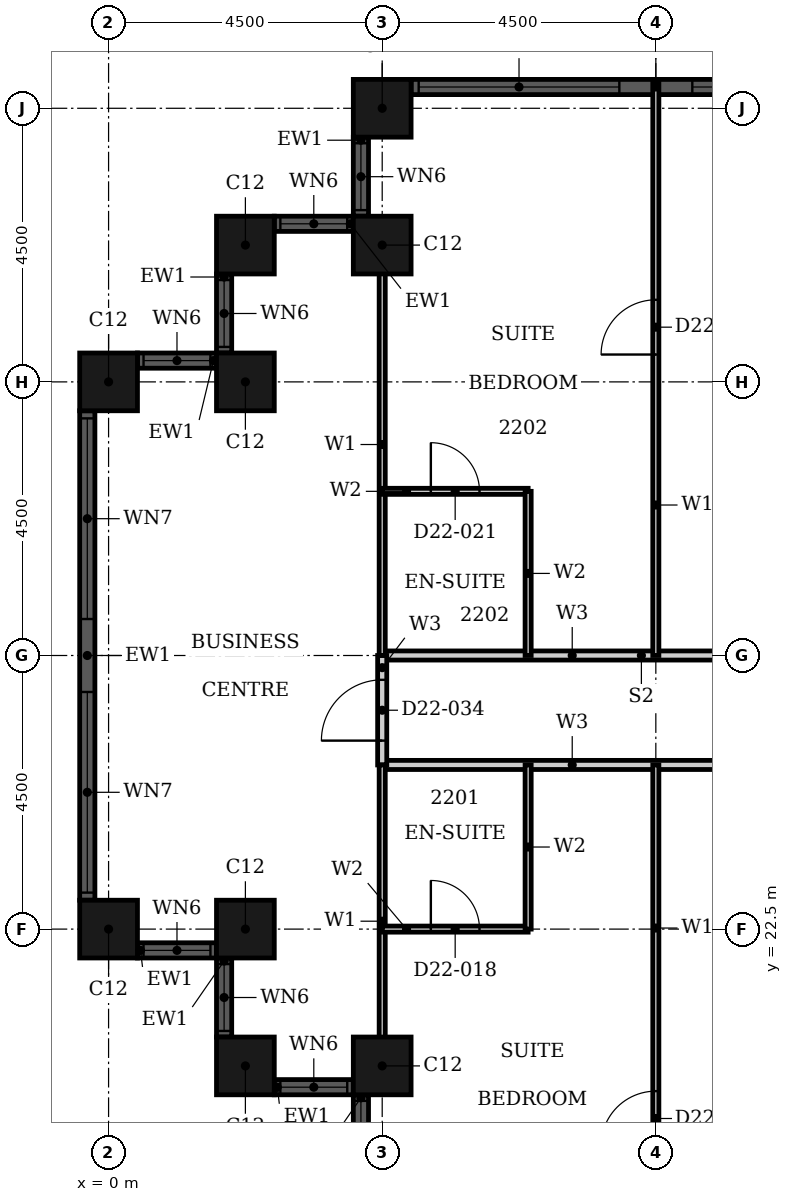
"""IFC4 building model, lengths in metres.
Left out: names, types, materials, properties, quantities, classifications, styles, units other than length and angle.
Written with IfcOpenShell. Run it as: python <this file> out.ifc"""

import sys

from ifc_helpers import new_model, si_unit, direction, frame, frame_2d, origin, origin_2d, place, context, subcontext, project, spatial, rectangle, hollow_rectangle, extrude, element, fill, save


model = new_model("IFC4")
c1 = context("Model", 3, precision=1e-05, world=origin(), true_north=direction((0.0, 1.0)))
c2 = subcontext(c1, "Body", "Model", "MODEL_VIEW")
j1 = project(units=[si_unit("LENGTHUNIT", "METRE"), si_unit("PLANEANGLEUNIT", "RADIAN")], contexts=[c1])
p1 = place(None, origin())
s1 = spatial("IfcSite", under=j1, at=p1, CompositionType="ELEMENT")
p2 = place(p1, origin())
s2 = spatial("IfcBuilding", under=s1, at=p2, CompositionType="ELEMENT")
p3 = place(p2, frame((0.0, 0.0, 92.4)))
s3 = spatial("IfcBuildingStorey", under=s2, at=p3, CompositionType="ELEMENT", Elevation=92.4)
for number, where, z_axis, x_axis in (
    (1, (4.5, 36.0, 0.0), (0.0, 0.0, 1.0), (1.0, 0.0, 0.0)),
    (2, (4.5, 33.75, 0.0), (0.0, 0.0, 1.0), (1.0, 0.0, 0.0)),
    (3, (2.25, 33.75, 0.0), (0.0, 0.0, 1.0), (1.0, 0.0, 0.0)),
    (4, (2.25, 31.5, 0.0), (0.0, 0.0, 1.0), (1.0, 0.0, 0.0)),
    (5, (0.0, 31.5, 0.0), (0.0, 0.0, 1.0), (1.0, 0.0, 0.0)),
    (6, (0.0, 22.5, 0.0), (0.0, 0.0, 1.0), (1.0, 0.0, 0.0)),
    (7, (2.25, 22.5, 0.0), (0.0, 0.0, 1.0), (1.0, 0.0, 0.0)),
    (8, (2.25, 20.25, 0.0), (0.0, 0.0, 1.0), (1.0, 0.0, 0.0)),
    (9, (4.5, 20.25, 0.0), (0.0, 0.0, 1.0), (1.0, 0.0, 0.0)),
):
    element("IfcColumn", number, at=place(p3, frame(where, z_axis=z_axis, x_axis=x_axis)), inside=s3, PredefinedType="COLUMN", context=c2, shape_type="SweptSolid", body=[
        extrude(hollow_rectangle(XDim=0.95, YDim=0.95, WallThickness=0.03, at=origin_2d()), origin(), (0.0, 0.0, 1.0), 3.6),
    ])
p4 = place(p3, frame((13.025, 36.35, 0.0), z_axis=(0.0, 0.0, 1.0), x_axis=(-1.0, 0.0, 0.0)))
e10 = element("IfcWall", 10, at=p4, inside=s3, PredefinedType="SOLIDWALL", context=c2, shape_type="SweptSolid", body=[
    extrude(rectangle(XDim=8.05, YDim=0.25, at=frame_2d((4.025, 0.0))), origin(), (0.0, 0.0, 1.0), 3.6),
])
p5 = place(p4, frame((0.125, 0.0, 0.9)))
e11 = element("IfcOpeningElement", 11, at=p5, cuts=e10, PredefinedType="OPENING", context=c2, shape_type="SweptSolid", body=[
    extrude(rectangle(XDim=3.3, YDim=1.85, at=frame_2d((1.65, 0.925))), frame((0.0, 0.135, 0.0), z_axis=(0.0, -1.0, 0.0), x_axis=(1.0, 0.0, 0.0)), (0.0, 0.0, 1.0), 0.27),
])
p6 = place(p4, frame((4.625, 0.0, 0.9)))
e12 = element("IfcOpeningElement", 12, at=p6, cuts=e10, PredefinedType="OPENING", context=c2, shape_type="SweptSolid", body=[
    extrude(rectangle(XDim=3.3, YDim=1.85, at=frame_2d((1.65, 0.925))), frame((0.0, 0.135, 0.0), z_axis=(0.0, -1.0, 0.0), x_axis=(1.0, 0.0, 0.0)), (0.0, 0.0, 1.0), 0.27),
])
p7 = place(p3, frame((4.15, 35.525, 0.0), z_axis=(0.0, 0.0, 1.0), x_axis=(0.0, -1.0, 0.0)))
e13 = element("IfcWall", 13, at=p7, inside=s3, PredefinedType="SOLIDWALL", context=c2, shape_type="SweptSolid", body=[
    extrude(rectangle(XDim=1.3, YDim=0.25, at=frame_2d((0.65, 0.0))), origin(), (0.0, 0.0, 1.0), 3.6),
])
p8 = place(p7, frame((0.1, 0.0, 0.9)))
e14 = element("IfcOpeningElement", 14, at=p8, cuts=e13, PredefinedType="OPENING", context=c2, shape_type="SweptSolid", body=[
    extrude(rectangle(XDim=1.1, YDim=1.85, at=frame_2d((0.55, 0.925))), frame((0.0, 0.135, 0.0), z_axis=(0.0, -1.0, 0.0), x_axis=(1.0, 0.0, 0.0)), (0.0, 0.0, 1.0), 0.27),
])
p9 = place(p3, frame((4.025, 34.1, 0.0), z_axis=(0.0, 0.0, 1.0), x_axis=(-1.0, 0.0, 0.0)))
e15 = element("IfcWall", 15, at=p9, inside=s3, PredefinedType="SOLIDWALL", context=c2, shape_type="SweptSolid", body=[
    extrude(rectangle(XDim=1.3, YDim=0.25, at=frame_2d((0.65, 0.0))), origin(), (0.0, 0.0, 1.0), 3.6),
])
p10 = place(p9, frame((0.1, 0.0, 0.9)))
e16 = element("IfcOpeningElement", 16, at=p10, cuts=e15, PredefinedType="OPENING", context=c2, shape_type="SweptSolid", body=[
    extrude(rectangle(XDim=1.1, YDim=1.85, at=frame_2d((0.55, 0.925))), frame((0.0, 0.135, 0.0), z_axis=(0.0, -1.0, 0.0), x_axis=(1.0, 0.0, 0.0)), (0.0, 0.0, 1.0), 0.27),
])
p11 = place(p3, frame((1.9, 33.275, 0.0), z_axis=(0.0, 0.0, 1.0), x_axis=(0.0, -1.0, 0.0)))
e17 = element("IfcWall", 17, at=p11, inside=s3, PredefinedType="SOLIDWALL", context=c2, shape_type="SweptSolid", body=[
    extrude(rectangle(XDim=1.3, YDim=0.25, at=frame_2d((0.65, 0.0))), origin(), (0.0, 0.0, 1.0), 3.6),
])
p12 = place(p11, frame((0.1, 0.0, 0.9)))
e18 = element("IfcOpeningElement", 18, at=p12, cuts=e17, PredefinedType="OPENING", context=c2, shape_type="SweptSolid", body=[
    extrude(rectangle(XDim=1.1, YDim=1.85, at=frame_2d((0.55, 0.925))), frame((0.0, 0.135, 0.0), z_axis=(0.0, -1.0, 0.0), x_axis=(1.0, 0.0, 0.0)), (0.0, 0.0, 1.0), 0.27),
])
p13 = place(p3, frame((1.775, 31.85, 0.0), z_axis=(0.0, 0.0, 1.0), x_axis=(-1.0, 0.0, 0.0)))
e19 = element("IfcWall", 19, at=p13, inside=s3, PredefinedType="SOLIDWALL", context=c2, shape_type="SweptSolid", body=[
    extrude(rectangle(XDim=1.3, YDim=0.25, at=frame_2d((0.65, 0.0))), origin(), (0.0, 0.0, 1.0), 3.6),
])
p14 = place(p13, frame((0.1, 0.0, 0.9)))
e20 = element("IfcOpeningElement", 20, at=p14, cuts=e19, PredefinedType="OPENING", context=c2, shape_type="SweptSolid", body=[
    extrude(rectangle(XDim=1.1, YDim=1.85, at=frame_2d((0.55, 0.925))), frame((0.0, 0.135, 0.0), z_axis=(0.0, -1.0, 0.0), x_axis=(1.0, 0.0, 0.0)), (0.0, 0.0, 1.0), 0.27),
])
p15 = place(p3, frame((-0.35, 31.025, 0.0), z_axis=(0.0, 0.0, 1.0), x_axis=(0.0, -1.0, 0.0)))
e21 = element("IfcWall", 21, at=p15, inside=s3, PredefinedType="SOLIDWALL", context=c2, shape_type="SweptSolid", body=[
    extrude(rectangle(XDim=8.05, YDim=0.25, at=frame_2d((4.025, 0.0))), origin(), (0.0, 0.0, 1.0), 3.6),
])
p16 = place(p15, frame((0.125, 0.0, 0.9)))
e22 = element("IfcOpeningElement", 22, at=p16, cuts=e21, PredefinedType="OPENING", context=c2, shape_type="SweptSolid", body=[
    extrude(rectangle(XDim=3.3, YDim=1.85, at=frame_2d((1.65, 0.925))), frame((0.0, 0.135, 0.0), z_axis=(0.0, -1.0, 0.0), x_axis=(1.0, 0.0, 0.0)), (0.0, 0.0, 1.0), 0.27),
])
p17 = place(p15, frame((4.625, 0.0, 0.9)))
e23 = element("IfcOpeningElement", 23, at=p17, cuts=e21, PredefinedType="OPENING", context=c2, shape_type="SweptSolid", body=[
    extrude(rectangle(XDim=3.3, YDim=1.85, at=frame_2d((1.65, 0.925))), frame((0.0, 0.135, 0.0), z_axis=(0.0, -1.0, 0.0), x_axis=(1.0, 0.0, 0.0)), (0.0, 0.0, 1.0), 0.27),
])
p18 = place(p3, frame((0.475, 22.15, 0.0), z_axis=(0.0, 0.0, 1.0), x_axis=(1.0, 0.0, 0.0)))
e24 = element("IfcWall", 24, at=p18, inside=s3, PredefinedType="SOLIDWALL", context=c2, shape_type="SweptSolid", body=[
    extrude(rectangle(XDim=1.3, YDim=0.25, at=frame_2d((0.65, 0.0))), origin(), (0.0, 0.0, 1.0), 3.6),
])
p19 = place(p18, frame((0.1, 0.0, 0.9)))
e25 = element("IfcOpeningElement", 25, at=p19, cuts=e24, PredefinedType="OPENING", context=c2, shape_type="SweptSolid", body=[
    extrude(rectangle(XDim=1.1, YDim=1.85, at=frame_2d((0.55, 0.925))), frame((0.0, 0.135, 0.0), z_axis=(0.0, -1.0, 0.0), x_axis=(1.0, 0.0, 0.0)), (0.0, 0.0, 1.0), 0.27),
])
p20 = place(p3, frame((1.9, 22.025, 0.0), z_axis=(0.0, 0.0, 1.0), x_axis=(0.0, -1.0, 0.0)))
e26 = element("IfcWall", 26, at=p20, inside=s3, PredefinedType="SOLIDWALL", context=c2, shape_type="SweptSolid", body=[
    extrude(rectangle(XDim=1.3, YDim=0.25, at=frame_2d((0.65, 0.0))), origin(), (0.0, 0.0, 1.0), 3.6),
])
p21 = place(p20, frame((0.1, 0.0, 0.9)))
e27 = element("IfcOpeningElement", 27, at=p21, cuts=e26, PredefinedType="OPENING", context=c2, shape_type="SweptSolid", body=[
    extrude(rectangle(XDim=1.1, YDim=1.85, at=frame_2d((0.55, 0.925))), frame((0.0, 0.135, 0.0), z_axis=(0.0, -1.0, 0.0), x_axis=(1.0, 0.0, 0.0)), (0.0, 0.0, 1.0), 0.27),
])
p22 = place(p3, frame((2.725, 19.9, 0.0), z_axis=(0.0, 0.0, 1.0), x_axis=(1.0, 0.0, 0.0)))
e28 = element("IfcWall", 28, at=p22, inside=s3, PredefinedType="SOLIDWALL", context=c2, shape_type="SweptSolid", body=[
    extrude(rectangle(XDim=1.3, YDim=0.25, at=frame_2d((0.65, 0.0))), origin(), (0.0, 0.0, 1.0), 3.6),
])
p23 = place(p22, frame((0.1, 0.0, 0.9)))
e29 = element("IfcOpeningElement", 29, at=p23, cuts=e28, PredefinedType="OPENING", context=c2, shape_type="SweptSolid", body=[
    extrude(rectangle(XDim=1.1, YDim=1.85, at=frame_2d((0.55, 0.925))), frame((0.0, 0.135, 0.0), z_axis=(0.0, -1.0, 0.0), x_axis=(1.0, 0.0, 0.0)), (0.0, 0.0, 1.0), 0.27),
])
p24 = place(p3, frame((4.15, 19.775, 0.0), z_axis=(0.0, 0.0, 1.0), x_axis=(0.0, -1.0, 0.0)))
e30 = element("IfcWall", 30, at=p24, inside=s3, PredefinedType="SOLIDWALL", context=c2, shape_type="SweptSolid", body=[
    extrude(rectangle(XDim=1.3, YDim=0.25, at=frame_2d((0.65, 0.0))), origin(), (0.0, 0.0, 1.0), 3.6),
])
p25 = place(p24, frame((0.1, 0.0, 0.9)))
e31 = element("IfcOpeningElement", 31, at=p25, cuts=e30, PredefinedType="OPENING", context=c2, shape_type="SweptSolid", body=[
    extrude(rectangle(XDim=1.1, YDim=1.85, at=frame_2d((0.55, 0.925))), frame((0.0, 0.135, 0.0), z_axis=(0.0, -1.0, 0.0), x_axis=(1.0, 0.0, 0.0)), (0.0, 0.0, 1.0), 0.27),
])
p26 = place(p3, frame((4.5, 25.2, 0.0), z_axis=(0.0, 0.0, 1.0), x_axis=(1.0, 0.0, 0.0)))
e32 = element("IfcWall", 32, at=p26, inside=s3, PredefinedType="PARTITIONING", context=c2, shape_type="SweptSolid", body=[
    extrude(rectangle(XDim=11.7, YDim=0.15, at=frame_2d((5.85, 0.0))), origin(), (0.0, 0.0, 1.0), 3.2),
])
p27 = place(p26, frame((6.25, 0.0, 0.0)))
e33 = element("IfcOpeningElement", 33, at=p27, cuts=e32, PredefinedType="OPENING", context=c2, shape_type="SweptSolid", body=[
    extrude(rectangle(XDim=1.0, YDim=2.1, at=frame_2d((0.5, 1.05))), frame((0.0, 0.085, 0.0), z_axis=(0.0, -1.0, 0.0), x_axis=(1.0, 0.0, 0.0)), (0.0, 0.0, 1.0), 0.17),
])
p28 = place(p3, frame((4.5, 27.0, 0.0), z_axis=(0.0, 0.0, 1.0), x_axis=(1.0, 0.0, 0.0)))
e34 = element("IfcWall", 34, at=p28, inside=s3, PredefinedType="PARTITIONING", context=c2, shape_type="SweptSolid", body=[
    extrude(rectangle(XDim=11.7, YDim=0.15, at=frame_2d((5.85, 0.0))), origin(), (0.0, 0.0, 1.0), 2.48),
])
p29 = place(p28, frame((6.25, 0.0, 0.0)))
e35 = element("IfcOpeningElement", 35, at=p29, cuts=e34, PredefinedType="OPENING", context=c2, shape_type="SweptSolid", body=[
    extrude(rectangle(XDim=1.0, YDim=2.1, at=frame_2d((0.5, 1.05))), frame((0.0, 0.085, 0.0), z_axis=(0.0, -1.0, 0.0), x_axis=(1.0, 0.0, 0.0)), (0.0, 0.0, 1.0), 0.17),
])
p30 = place(p3, frame((4.5, 25.2, 0.0), z_axis=(0.0, 0.0, 1.0), x_axis=(0.0, 1.0, 0.0)))
e36 = element("IfcWall", 36, at=p30, inside=s3, PredefinedType="PARTITIONING", context=c2, shape_type="SweptSolid", body=[
    extrude(rectangle(XDim=1.8, YDim=0.15, at=frame_2d((0.9, 0.0))), origin(), (0.0, 0.0, 1.0), 3.2),
])
p31 = place(p30, frame((0.4, 0.0, 0.0)))
e37 = element("IfcOpeningElement", 37, at=p31, cuts=e36, PredefinedType="OPENING", context=c2, shape_type="SweptSolid", body=[
    extrude(rectangle(XDim=1.0, YDim=2.1, at=frame_2d((0.5, 1.05))), frame((0.0, 0.085, 0.0), z_axis=(0.0, -1.0, 0.0), x_axis=(1.0, 0.0, 0.0)), (0.0, 0.0, 1.0), 0.17),
])
p32 = place(p3, frame((4.5, 27.0, 0.0), z_axis=(0.0, 0.0, 1.0), x_axis=(0.0, 1.0, 0.0)))
e38 = element("IfcWall", 38, at=p32, inside=s3, PredefinedType="PARTITIONING", context=c2, shape_type="SweptSolid", body=[
    extrude(rectangle(XDim=6.94, YDim=0.1, at=frame_2d((3.47, 0.0))), origin(), (0.0, 0.0, 1.0), 3.2),
])
p33 = place(p3, frame((4.5, 20.06, 0.0), z_axis=(0.0, 0.0, 1.0), x_axis=(0.0, 1.0, 0.0)))
e39 = element("IfcWall", 39, at=p33, inside=s3, PredefinedType="PARTITIONING", context=c2, shape_type="SweptSolid", body=[
    extrude(rectangle(XDim=5.14, YDim=0.1, at=frame_2d((2.57, 0.0))), origin(), (0.0, 0.0, 1.0), 3.2),
])
p34 = place(p3, frame((9.0, 27.0, 0.0), z_axis=(0.0, 0.0, 1.0), x_axis=(0.0, 1.0, 0.0)))
e40 = element("IfcWall", 40, at=p34, inside=s3, PredefinedType="PARTITIONING", context=c2, shape_type="SweptSolid", body=[
    extrude(rectangle(XDim=9.415, YDim=0.1, at=frame_2d((4.708, 0.0))), origin(), (0.0, 0.0, 1.0), 3.2),
])
p35 = place(p34, frame((4.95, 0.0, 0.0)))
e41 = element("IfcOpeningElement", 41, at=p35, cuts=e40, PredefinedType="OPENING", context=c2, shape_type="SweptSolid", body=[
    extrude(rectangle(XDim=0.9, YDim=2.1, at=frame_2d((0.45, 1.05))), frame((0.0, 0.06, 0.0), z_axis=(0.0, -1.0, 0.0), x_axis=(1.0, 0.0, 0.0)), (0.0, 0.0, 1.0), 0.12),
])
p36 = place(p3, frame((9.0, 17.585, 0.0), z_axis=(0.0, 0.0, 1.0), x_axis=(0.0, 1.0, 0.0)))
e42 = element("IfcWall", 42, at=p36, inside=s3, PredefinedType="PARTITIONING", context=c2, shape_type="SweptSolid", body=[
    extrude(rectangle(XDim=7.615, YDim=0.1, at=frame_2d((3.808, 0.0))), origin(), (0.0, 0.0, 1.0), 3.2),
])
p37 = place(p36, frame((1.35, 0.0, 0.0)))
e43 = element("IfcOpeningElement", 43, at=p37, cuts=e42, PredefinedType="OPENING", context=c2, shape_type="SweptSolid", body=[
    extrude(rectangle(XDim=0.9, YDim=2.1, at=frame_2d((0.45, 1.05))), frame((0.0, 0.06, 0.0), z_axis=(0.0, -1.0, 0.0), x_axis=(1.0, 0.0, 0.0)), (0.0, 0.0, 1.0), 0.12),
])
p38 = place(p3, frame((4.5, 22.5, 0.0), z_axis=(0.0, 0.0, 1.0), x_axis=(1.0, 0.0, 0.0)))
e44 = element("IfcWall", 44, at=p38, inside=s3, PredefinedType="PARTITIONING", context=c2, shape_type="SweptSolid", body=[
    extrude(rectangle(XDim=2.4, YDim=0.1, at=frame_2d((1.2, 0.0))), origin(), (0.0, 0.0, 1.0), 2.48),
])
p39 = place(p38, frame((0.8, 0.0, 0.0)))
e45 = element("IfcOpeningElement", 45, at=p39, cuts=e44, PredefinedType="OPENING", context=c2, shape_type="SweptSolid", body=[
    extrude(rectangle(XDim=0.8, YDim=2.1, at=frame_2d((0.4, 1.05))), frame((0.0, 0.06, 0.0), z_axis=(0.0, -1.0, 0.0), x_axis=(1.0, 0.0, 0.0)), (0.0, 0.0, 1.0), 0.12),
])
p40 = place(p3, frame((4.5, 29.7, 0.0), z_axis=(0.0, 0.0, 1.0), x_axis=(1.0, 0.0, 0.0)))
e46 = element("IfcWall", 46, at=p40, inside=s3, PredefinedType="PARTITIONING", context=c2, shape_type="SweptSolid", body=[
    extrude(rectangle(XDim=2.4, YDim=0.1, at=frame_2d((1.2, 0.0))), origin(), (0.0, 0.0, 1.0), 3.2),
])
p41 = place(p40, frame((0.8, 0.0, 0.0)))
e47 = element("IfcOpeningElement", 47, at=p41, cuts=e46, PredefinedType="OPENING", context=c2, shape_type="SweptSolid", body=[
    extrude(rectangle(XDim=0.8, YDim=2.1, at=frame_2d((0.4, 1.05))), frame((0.0, 0.06, 0.0), z_axis=(0.0, -1.0, 0.0), x_axis=(1.0, 0.0, 0.0)), (0.0, 0.0, 1.0), 0.12),
])
for number, where, z_axis, x_axis in (
    (48, (6.9, 27.0, 0.0), (0.0, 0.0, 1.0), (0.0, 1.0, 0.0)),
    (49, (6.9, 22.5, 0.0), (0.0, 0.0, 1.0), (0.0, 1.0, 0.0)),
):
    element("IfcWall", number, at=place(p3, frame(where, z_axis=z_axis, x_axis=x_axis)), inside=s3, PredefinedType="PARTITIONING", context=c2, shape_type="SweptSolid", body=[
        extrude(rectangle(XDim=2.7, YDim=0.1, at=frame_2d((1.35, 0.0))), origin(), (0.0, 0.0, 1.0), 3.2),
    ])
p42 = place(p5, origin())
e50 = element("IfcWindow", 50, at=p42, inside=s3, PartitioningType="SINGLE_PANEL", PredefinedType="WINDOW", context=c2, shape_type="SweptSolid", body=[
    extrude(rectangle(XDim=3.3, YDim=1.85, at=frame_2d((1.65, 0.925))), frame((0.0, 0.03, 0.0), z_axis=(0.0, -1.0, 0.0), x_axis=(1.0, 0.0, 0.0)), (0.0, 0.0, 1.0), 0.06),
])
fill(e11, e50)
p43 = place(p6, origin())
e51 = element("IfcWindow", 51, at=p43, inside=s3, PartitioningType="SINGLE_PANEL", PredefinedType="WINDOW", context=c2, shape_type="SweptSolid", body=[
    extrude(rectangle(XDim=3.3, YDim=1.85, at=frame_2d((1.65, 0.925))), frame((0.0, 0.03, 0.0), z_axis=(0.0, -1.0, 0.0), x_axis=(1.0, 0.0, 0.0)), (0.0, 0.0, 1.0), 0.06),
])
fill(e12, e51)
p44 = place(p8, origin())
e52 = element("IfcWindow", 52, at=p44, inside=s3, PartitioningType="SINGLE_PANEL", PredefinedType="WINDOW", context=c2, shape_type="SweptSolid", body=[
    extrude(rectangle(XDim=1.1, YDim=1.85, at=frame_2d((0.55, 0.925))), frame((0.0, 0.03, 0.0), z_axis=(0.0, -1.0, 0.0), x_axis=(1.0, 0.0, 0.0)), (0.0, 0.0, 1.0), 0.06),
])
fill(e14, e52)
p45 = place(p10, origin())
e53 = element("IfcWindow", 53, at=p45, inside=s3, PartitioningType="SINGLE_PANEL", PredefinedType="WINDOW", context=c2, shape_type="SweptSolid", body=[
    extrude(rectangle(XDim=1.1, YDim=1.85, at=frame_2d((0.55, 0.925))), frame((0.0, 0.03, 0.0), z_axis=(0.0, -1.0, 0.0), x_axis=(1.0, 0.0, 0.0)), (0.0, 0.0, 1.0), 0.06),
])
fill(e16, e53)
p46 = place(p12, origin())
e54 = element("IfcWindow", 54, at=p46, inside=s3, PartitioningType="SINGLE_PANEL", PredefinedType="WINDOW", context=c2, shape_type="SweptSolid", body=[
    extrude(rectangle(XDim=1.1, YDim=1.85, at=frame_2d((0.55, 0.925))), frame((0.0, 0.03, 0.0), z_axis=(0.0, -1.0, 0.0), x_axis=(1.0, 0.0, 0.0)), (0.0, 0.0, 1.0), 0.06),
])
fill(e18, e54)
p47 = place(p14, origin())
e55 = element("IfcWindow", 55, at=p47, inside=s3, PartitioningType="SINGLE_PANEL", PredefinedType="WINDOW", context=c2, shape_type="SweptSolid", body=[
    extrude(rectangle(XDim=1.1, YDim=1.85, at=frame_2d((0.55, 0.925))), frame((0.0, 0.03, 0.0), z_axis=(0.0, -1.0, 0.0), x_axis=(1.0, 0.0, 0.0)), (0.0, 0.0, 1.0), 0.06),
])
fill(e20, e55)
p48 = place(p16, origin())
e56 = element("IfcWindow", 56, at=p48, inside=s3, PartitioningType="SINGLE_PANEL", PredefinedType="WINDOW", context=c2, shape_type="SweptSolid", body=[
    extrude(rectangle(XDim=3.3, YDim=1.85, at=frame_2d((1.65, 0.925))), frame((0.0, 0.03, 0.0), z_axis=(0.0, -1.0, 0.0), x_axis=(1.0, 0.0, 0.0)), (0.0, 0.0, 1.0), 0.06),
])
fill(e22, e56)
p49 = place(p17, origin())
e57 = element("IfcWindow", 57, at=p49, inside=s3, PartitioningType="SINGLE_PANEL", PredefinedType="WINDOW", context=c2, shape_type="SweptSolid", body=[
    extrude(rectangle(XDim=3.3, YDim=1.85, at=frame_2d((1.65, 0.925))), frame((0.0, 0.03, 0.0), z_axis=(0.0, -1.0, 0.0), x_axis=(1.0, 0.0, 0.0)), (0.0, 0.0, 1.0), 0.06),
])
fill(e23, e57)
p50 = place(p19, origin())
e58 = element("IfcWindow", 58, at=p50, inside=s3, PartitioningType="SINGLE_PANEL", PredefinedType="WINDOW", context=c2, shape_type="SweptSolid", body=[
    extrude(rectangle(XDim=1.1, YDim=1.85, at=frame_2d((0.55, 0.925))), frame((0.0, 0.03, 0.0), z_axis=(0.0, -1.0, 0.0), x_axis=(1.0, 0.0, 0.0)), (0.0, 0.0, 1.0), 0.06),
])
fill(e25, e58)
p51 = place(p21, origin())
e59 = element("IfcWindow", 59, at=p51, inside=s3, PartitioningType="SINGLE_PANEL", PredefinedType="WINDOW", context=c2, shape_type="SweptSolid", body=[
    extrude(rectangle(XDim=1.1, YDim=1.85, at=frame_2d((0.55, 0.925))), frame((0.0, 0.03, 0.0), z_axis=(0.0, -1.0, 0.0), x_axis=(1.0, 0.0, 0.0)), (0.0, 0.0, 1.0), 0.06),
])
fill(e27, e59)
p52 = place(p23, origin())
e60 = element("IfcWindow", 60, at=p52, inside=s3, PartitioningType="SINGLE_PANEL", PredefinedType="WINDOW", context=c2, shape_type="SweptSolid", body=[
    extrude(rectangle(XDim=1.1, YDim=1.85, at=frame_2d((0.55, 0.925))), frame((0.0, 0.03, 0.0), z_axis=(0.0, -1.0, 0.0), x_axis=(1.0, 0.0, 0.0)), (0.0, 0.0, 1.0), 0.06),
])
fill(e29, e60)
p53 = place(p25, origin())
e61 = element("IfcWindow", 61, at=p53, inside=s3, PartitioningType="SINGLE_PANEL", PredefinedType="WINDOW", context=c2, shape_type="SweptSolid", body=[
    extrude(rectangle(XDim=1.1, YDim=1.85, at=frame_2d((0.55, 0.925))), frame((0.0, 0.03, 0.0), z_axis=(0.0, -1.0, 0.0), x_axis=(1.0, 0.0, 0.0)), (0.0, 0.0, 1.0), 0.06),
])
fill(e31, e61)
p54 = place(p37, origin())
e62 = element("IfcDoor", 62, at=p54, inside=s3, OperationType="SINGLE_SWING_LEFT", PredefinedType="DOOR", context=c2, shape_type="SweptSolid", body=[
    extrude(rectangle(XDim=0.9, YDim=2.1, at=frame_2d((0.45, 1.05))), frame((0.0, 0.025, 0.0), z_axis=(0.0, -1.0, 0.0), x_axis=(1.0, 0.0, 0.0)), (0.0, 0.0, 1.0), 0.05),
])
fill(e43, e62)
p55 = place(p39, origin())
e63 = element("IfcDoor", 63, at=p55, inside=s3, OperationType="SINGLE_SWING_LEFT", PredefinedType="DOOR", context=c2, shape_type="SweptSolid", body=[
    extrude(rectangle(XDim=0.8, YDim=2.1, at=frame_2d((0.4, 1.05))), frame((0.0, 0.025, 0.0), z_axis=(0.0, -1.0, 0.0), x_axis=(1.0, 0.0, 0.0)), (0.0, 0.0, 1.0), 0.05),
])
fill(e45, e63)
p56 = place(p35, origin())
e64 = element("IfcDoor", 64, at=p56, inside=s3, OperationType="SINGLE_SWING_RIGHT", PredefinedType="DOOR", context=c2, shape_type="SweptSolid", body=[
    extrude(rectangle(XDim=0.9, YDim=2.1, at=frame_2d((0.45, 1.05))), frame((0.0, 0.025, 0.0), z_axis=(0.0, -1.0, 0.0), x_axis=(1.0, 0.0, 0.0)), (0.0, 0.0, 1.0), 0.05),
])
fill(e41, e64)
p57 = place(p41, origin())
e65 = element("IfcDoor", 65, at=p57, inside=s3, OperationType="SINGLE_SWING_LEFT", PredefinedType="DOOR", context=c2, shape_type="SweptSolid", body=[
    extrude(rectangle(XDim=0.8, YDim=2.1, at=frame_2d((0.4, 1.05))), frame((0.0, 0.025, 0.0), z_axis=(0.0, -1.0, 0.0), x_axis=(1.0, 0.0, 0.0)), (0.0, 0.0, 1.0), 0.05),
])
fill(e47, e65)
p58 = place(p31, origin())
e66 = element("IfcDoor", 66, at=p58, inside=s3, OperationType="SINGLE_SWING_RIGHT", PredefinedType="DOOR", context=c2, shape_type="SweptSolid", body=[
    extrude(rectangle(XDim=1.0, YDim=2.1, at=frame_2d((0.5, 1.05))), frame((0.0, 0.025, 0.0), z_axis=(0.0, -1.0, 0.0), x_axis=(1.0, 0.0, 0.0)), (0.0, 0.0, 1.0), 0.05),
])
fill(e37, e66)
save(model, sys.argv[1])
